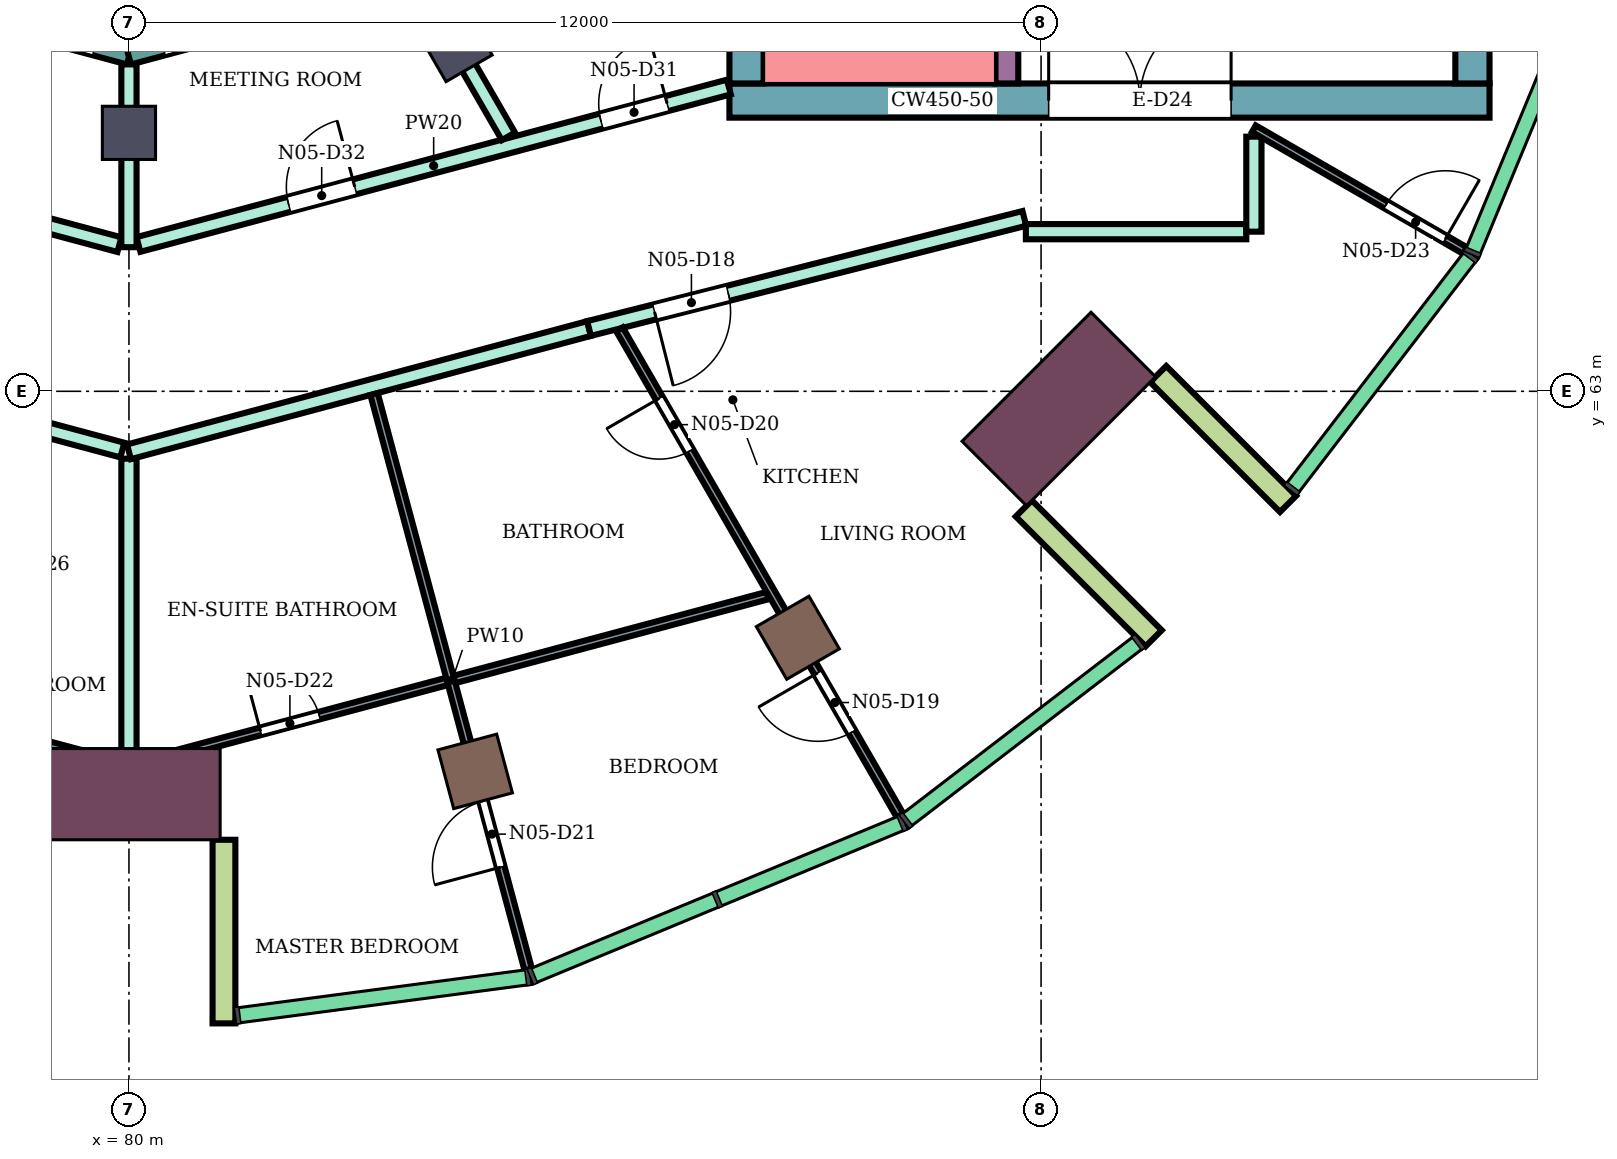
"""IFC4 building model, lengths in metres.
Left out: names, types, materials, properties, quantities, classifications, styles, units other than length and angle.
Written with IfcOpenShell. Run it as: python <this file> out.ifc"""

import sys

from ifc_helpers import new_model, si_unit, direction, frame, frame_2d, origin, origin_2d, place, context, subcontext, project, spatial, rectangle, extrude, element, fill, save


model = new_model("IFC4")
c1 = context("Model", 3, precision=1e-05, world=origin(), true_north=direction((0.0, 1.0)))
c2 = subcontext(c1, "Body", "Model", "MODEL_VIEW")
j1 = project(units=[si_unit("LENGTHUNIT", "METRE"), si_unit("PLANEANGLEUNIT", "RADIAN")], contexts=[c1])
p1 = place(None, origin())
s1 = spatial("IfcSite", under=j1, at=p1, CompositionType="ELEMENT")
p2 = place(p1, origin())
s2 = spatial("IfcBuilding", under=s1, at=p2, CompositionType="ELEMENT")
p3 = place(p2, frame((0.0, 0.0, 319.3)))
s3 = spatial("IfcBuildingStorey", under=s2, at=p3, CompositionType="ELEMENT", Elevation=319.3)
for number, where, z_axis, x_axis in (
    (1, (84.555, 58.0, 0.0), (0.0, 0.0, 1.0), (0.259, -0.966, 0.0)),
    (2, (88.8, 59.758, 0.0), (0.0, 0.0, 1.0), (0.5, -0.866, 0.0)),
):
    element("IfcColumn", number, at=place(p3, frame(where, z_axis=z_axis, x_axis=x_axis)), inside=s3, PredefinedType="COLUMN", context=c2, shape_type="SweptSolid", body=[
        extrude(rectangle(XDim=0.8, YDim=0.8, at=origin_2d()), origin(), (0.0, 0.0, 1.0), 4.4),
    ])
for number, where, z_axis, x_axis in (
    (3, (80.0, 66.4, 0.0), (0.0, 0.0, 1.0), (0.0, -1.0, 0.0)),
    (4, (84.3, 67.552, 0.0), (0.0, 0.0, 1.0), (0.5, -0.866, 0.0)),
):
    element("IfcColumn", number, at=place(p3, frame(where, z_axis=z_axis, x_axis=x_axis)), inside=s3, PredefinedType="COLUMN", context=c2, shape_type="SweptSolid", body=[
        extrude(rectangle(XDim=0.7, YDim=0.7, at=origin_2d()), origin(), (0.0, 0.0, 1.0), 4.4),
    ])
for number, where, z_axis, x_axis in (
    (5, (80.0, 57.7, 0.0), (0.0, 0.0, 1.0), (0.0, -1.0, 0.0)),
    (6, (92.233, 62.767, 0.0), (0.0, 0.0, 1.0), (0.707, -0.707, 0.0)),
):
    element("IfcColumn", number, at=place(p3, frame(where, z_axis=z_axis, x_axis=x_axis)), inside=s3, PredefinedType="COLUMN", context=c2, shape_type="SweptSolid", body=[
        extrude(rectangle(XDim=1.2, YDim=2.4, at=origin_2d()), origin(), (0.0, 0.0, 1.0), 4.4),
    ])
p4 = place(p3, frame((87.9, 66.825, 0.0), z_axis=(0.0, 0.0, 1.0), x_axis=(1.0, 0.0, 0.0)))
e7 = element("IfcWall", 7, at=p4, inside=s3, PredefinedType="SHEAR", context=c2, shape_type="SweptSolid", body=[
    extrude(rectangle(XDim=10.0, YDim=0.45, at=frame_2d((5.0, 0.0))), origin(), (0.0, 0.0, 1.0), 4.08),
])
p5 = place(p4, frame((4.2, 0.0, 0.0)))
e8 = element("IfcOpeningElement", 8, at=p5, cuts=e7, PredefinedType="OPENING", context=c2, shape_type="SweptSolid", body=[
    extrude(rectangle(XDim=2.4, YDim=2.4, at=frame_2d((1.2, 1.2))), frame((0.0, 0.235, 0.0), z_axis=(0.0, -1.0, 0.0), x_axis=(1.0, 0.0, 0.0)), (0.0, 0.0, 1.0), 0.47),
])
p6 = place(p3, frame((88.125, 67.05, 0.0), z_axis=(0.0, 0.0, 1.0), x_axis=(0.0, 1.0, 0.0)))
e9 = element("IfcWall", 9, at=p6, inside=s3, PredefinedType="SHEAR", context=c2, shape_type="SweptSolid", body=[
    extrude(rectangle(XDim=7.95, YDim=0.45, at=frame_2d((3.975, 0.0))), origin(), (0.0, 0.0, 1.0), 4.08),
])
p7 = place(p3, frame((97.675, 67.05, 0.0), z_axis=(0.0, 0.0, 1.0), x_axis=(0.0, 1.0, 0.0)))
e10 = element("IfcWall", 10, at=p7, inside=s3, PredefinedType="SHEAR", context=c2, shape_type="SweptSolid", body=[
    extrude(rectangle(XDim=3.7, YDim=0.45, at=frame_2d((1.85, 0.0))), origin(), (0.0, 0.0, 1.0), 4.08),
])
p8 = place(p3, frame((91.55, 67.05, 0.0), z_axis=(0.0, 0.0, 1.0), x_axis=(0.0, 1.0, 0.0)))
e11 = element("IfcWall", 11, at=p8, inside=s3, PredefinedType="SHEAR", context=c2, shape_type="SweptSolid", body=[
    extrude(rectangle(XDim=7.95, YDim=0.3, at=frame_2d((3.975, 0.0))), origin(), (0.0, 0.0, 1.0), 4.08),
])
p9 = place(p8, frame((0.6, 0.0, 0.0)))
e12 = element("IfcOpeningElement", 12, at=p9, cuts=e11, PredefinedType="OPENING", context=c2, shape_type="SweptSolid", body=[
    extrude(rectangle(XDim=0.9, YDim=2.1, at=frame_2d((0.45, 1.05))), frame((0.0, 0.16, 0.0), z_axis=(0.0, -1.0, 0.0), x_axis=(1.0, 0.0, 0.0)), (0.0, 0.0, 1.0), 0.32),
])
for number, where, z_axis, x_axis in (
    (13, (81.25, 57.1, 0.0), (0.0, 0.0, 1.0), (0.0, -1.0, 0.0)),
    (14, (91.773, 61.459, 0.0), (0.0, 0.0, 1.0), (0.707, -0.707, 0.0)),
    (15, (93.541, 63.227, 0.0), (0.0, 0.0, 1.0), (0.707, -0.707, 0.0)),
):
    element("IfcWall", number, at=place(p3, frame(where, z_axis=z_axis, x_axis=x_axis)), inside=s3, PredefinedType="NOTDEFINED", context=c2, shape_type="SweptSolid", body=[
        extrude(rectangle(XDim=2.416, YDim=0.3, at=frame_2d((1.208, 0.0))), origin(), (0.0, 0.0, 1.0), 4.4),
    ])
p10 = place(p3, frame((76.198, 68.415, 0.0), z_axis=(0.0, 0.0, 1.0), x_axis=(0.965933654434, -0.258789828301, 0.0)))
e16 = element("IfcWall", 16, at=p10, inside=s3, PredefinedType="NOTDEFINED", context=c2, shape_type="SweptSolid", body=[
    extrude(rectangle(XDim=3.936, YDim=0.2, at=frame_2d((1.968, 0.0))), origin(), (0.0, 0.0, 1.0), 4.4),
])
p11 = place(p10, frame((0.468, 0.0, 0.9)))
e17 = element("IfcOpeningElement", 17, at=p11, cuts=e16, PredefinedType="OPENING", context=c2, shape_type="SweptSolid", body=[
    extrude(rectangle(XDim=3.0, YDim=2.3, at=frame_2d((1.5, 1.15))), frame((0.0, 0.11, 0.0), z_axis=(0.0, -1.0, 0.0), x_axis=(1.0, 0.0, 0.0)), (0.0, 0.0, 1.0), 0.22),
])
p12 = place(p3, frame((80.0, 67.396, 0.0), z_axis=(0.0, 0.0, 1.0), x_axis=(0.965933654434, 0.258789828301, 0.0)))
e18 = element("IfcWall", 18, at=p12, inside=s3, PredefinedType="NOTDEFINED", context=c2, shape_type="SweptSolid", body=[
    extrude(rectangle(XDim=3.936, YDim=0.2, at=frame_2d((1.968, 0.0))), origin(), (0.0, 0.0, 1.0), 4.4),
])
p13 = place(p12, frame((0.468, 0.0, 0.9)))
e19 = element("IfcOpeningElement", 19, at=p13, cuts=e18, PredefinedType="OPENING", context=c2, shape_type="SweptSolid", body=[
    extrude(rectangle(XDim=3.0, YDim=2.3, at=frame_2d((1.5, 1.15))), frame((0.0, 0.11, 0.0), z_axis=(0.0, -1.0, 0.0), x_axis=(1.0, 0.0, 0.0)), (0.0, 0.0, 1.0), 0.22),
])
p14 = place(p3, frame((73.947, 63.826, 0.0), z_axis=(0.0, 0.0, 1.0), x_axis=(0.965894934009, -0.25893430915, 0.0)))
e20 = element("IfcWall", 20, at=p14, inside=s3, PredefinedType="PARTITIONING", context=c2, shape_type="SweptSolid", body=[
    extrude(rectangle(XDim=6.177, YDim=0.2, at=frame_2d((3.088, 0.0))), origin(), (0.0, 0.0, 1.0), 3.95),
])
p15 = place(p14, frame((3.336, 0.0, 0.0)))
e21 = element("IfcOpeningElement", 21, at=p15, cuts=e20, PredefinedType="OPENING", context=c2, shape_type="SweptSolid", body=[
    extrude(rectangle(XDim=1.0, YDim=2.1, at=frame_2d((0.5, 1.05))), frame((0.0, 0.11, 0.0), z_axis=(0.0, -1.0, 0.0), x_axis=(1.0, 0.0, 0.0)), (0.0, 0.0, 1.0), 0.22),
])
p16 = place(p14, frame((1.424, 0.0, 0.0)))
e22 = element("IfcOpeningElement", 22, at=p16, cuts=e20, PredefinedType="OPENING", context=c2, shape_type="SweptSolid", body=[
    extrude(rectangle(XDim=1.0, YDim=2.1, at=frame_2d((0.5, 1.05))), frame((0.0, 0.11, 0.0), z_axis=(0.0, -1.0, 0.0), x_axis=(1.0, 0.0, 0.0)), (0.0, 0.0, 1.0), 0.22),
])
p17 = place(p3, frame((74.603, 66.342, 0.0), z_axis=(0.0, 0.0, 1.0), x_axis=(0.965920893652, -0.258837453254, 0.0)))
e23 = element("IfcWall", 23, at=p17, inside=s3, PredefinedType="PARTITIONING", context=c2, shape_type="SweptSolid", body=[
    extrude(rectangle(XDim=5.458, YDim=0.2, at=frame_2d((2.729, 0.0))), origin(), (0.0, 0.0, 1.0), 3.95),
])
p18 = place(p17, frame((2.512, 0.0, 0.0)))
e24 = element("IfcOpeningElement", 24, at=p18, cuts=e23, PredefinedType="OPENING", context=c2, shape_type="SweptSolid", body=[
    extrude(rectangle(XDim=0.9, YDim=2.1, at=frame_2d((0.45, 1.05))), frame((0.0, 0.11, 0.0), z_axis=(0.0, -1.0, 0.0), x_axis=(1.0, 0.0, 0.0)), (0.0, 0.0, 1.0), 0.22),
])
p19 = place(p3, frame((80.125, 64.932, 0.0), z_axis=(0.0, 0.0, 1.0), x_axis=(0.966236955806, 0.257655089674, 0.0)))
e25 = element("IfcWall", 25, at=p19, inside=s3, PredefinedType="PARTITIONING", context=c2, shape_type="SweptSolid", body=[
    extrude(rectangle(XDim=8.039, YDim=0.2, at=frame_2d((4.02, 0.0))), origin(), (0.0, 0.0, 1.0), 3.95),
])
p20 = place(p19, frame((6.298, 0.0, 0.0)))
e26 = element("IfcOpeningElement", 26, at=p20, cuts=e25, PredefinedType="OPENING", context=c2, shape_type="SweptSolid", body=[
    extrude(rectangle(XDim=0.9, YDim=2.1, at=frame_2d((0.45, 1.05))), frame((0.0, 0.11, 0.0), z_axis=(0.0, -1.0, 0.0), x_axis=(1.0, 0.0, 0.0)), (0.0, 0.0, 1.0), 0.22),
])
p21 = place(p19, frame((2.045, 0.0, 0.0)))
e27 = element("IfcOpeningElement", 27, at=p21, cuts=e25, PredefinedType="OPENING", context=c2, shape_type="SweptSolid", body=[
    extrude(rectangle(XDim=0.9, YDim=2.1, at=frame_2d((0.45, 1.05))), frame((0.0, 0.11, 0.0), z_axis=(0.0, -1.0, 0.0), x_axis=(1.0, 0.0, 0.0)), (0.0, 0.0, 1.0), 0.22),
])
p22 = place(p3, frame((80.0, 57.3, 0.0), z_axis=(0.0, 0.0, 1.0), x_axis=(0.0, 1.0, 0.0)))
e28 = element("IfcWall", 28, at=p22, inside=s3, PredefinedType="PARTITIONING", context=c2, shape_type="SweptSolid", body=[
    extrude(rectangle(XDim=4.814, YDim=0.2, at=frame_2d((2.407, 0.0))), origin(), (0.0, 0.0, 1.0), 3.95),
])
p23 = place(p3, frame((80.0, 62.204, 0.0), z_axis=(0.0, 0.0, 1.0), x_axis=(0.965938139786, 0.258773086132, 0.0)))
e29 = element("IfcWall", 29, at=p23, inside=s3, PredefinedType="PARTITIONING", context=c2, shape_type="SweptSolid", body=[
    extrude(rectangle(XDim=6.266, YDim=0.2, at=frame_2d((3.133, 0.0))), origin(), (0.0, 0.0, 1.0), 3.95),
])
p24 = place(p3, frame((80.0, 64.896, 0.0), z_axis=(0.0, 0.0, 1.0), x_axis=(0.0, 1.0, 0.0)))
e30 = element("IfcWall", 30, at=p24, inside=s3, PredefinedType="PARTITIONING", context=c2, shape_type="SweptSolid", body=[
    extrude(rectangle(XDim=2.405, YDim=0.2, at=frame_2d((1.203, 0.0))), origin(), (0.0, 0.0, 1.0), 3.95),
])
p25 = place(p3, frame((83.85, 68.333, 0.0), z_axis=(0.0, 0.0, 1.0), x_axis=(0.500080019051, -0.865979199835, 0.0)))
e31 = element("IfcWall", 31, at=p25, inside=s3, PredefinedType="PARTITIONING", context=c2, shape_type="SweptSolid", body=[
    extrude(rectangle(XDim=2.285, YDim=0.2, at=frame_2d((1.143, 0.0))), origin(), (0.0, 0.0, 1.0), 3.95),
])
p26 = place(p3, frame((86.053, 63.826, 0.0), z_axis=(0.0, 0.0, 1.0), x_axis=(0.969480070232, 0.245170131586, 0.0)))
e32 = element("IfcWall", 32, at=p26, inside=s3, PredefinedType="PARTITIONING", context=c2, shape_type="SweptSolid", body=[
    extrude(rectangle(XDim=5.907, YDim=0.2, at=frame_2d((2.954, 0.0))), origin(), (0.0, 0.0, 1.0), 3.95),
])
p27 = place(p26, frame((0.889, 0.0, 0.0)))
e33 = element("IfcOpeningElement", 33, at=p27, cuts=e32, PredefinedType="OPENING", context=c2, shape_type="SweptSolid", body=[
    extrude(rectangle(XDim=1.0, YDim=2.1, at=frame_2d((0.5, 1.05))), frame((0.0, 0.11, 0.0), z_axis=(0.0, -1.0, 0.0), x_axis=(1.0, 0.0, 0.0)), (0.0, 0.0, 1.0), 0.22),
])
p28 = place(p3, frame((91.8, 65.1, 0.0), z_axis=(0.0, 0.0, 1.0), x_axis=(1.0, 0.0, 0.0)))
e34 = element("IfcWall", 34, at=p28, inside=s3, PredefinedType="PARTITIONING", context=c2, shape_type="SweptSolid", body=[
    extrude(rectangle(XDim=2.9, YDim=0.2, at=frame_2d((1.45, 0.0))), origin(), (0.0, 0.0, 1.0), 3.95),
])
p29 = place(p3, frame((94.8, 65.1, 0.0), z_axis=(0.0, 0.0, 1.0), x_axis=(0.0, 1.0, 0.0)))
e35 = element("IfcWall", 35, at=p29, inside=s3, PredefinedType="PARTITIONING", context=c2, shape_type="SweptSolid", body=[
    extrude(rectangle(XDim=1.25, YDim=0.2, at=frame_2d((0.625, 0.0))), origin(), (0.0, 0.0, 1.0), 3.95),
])
p30 = place(p3, frame((75.862, 59.171, 0.0), z_axis=(0.0, 0.0, 1.0), x_axis=(0.965961623338, -0.258685411723, 0.0)))
e36 = element("IfcWall", 36, at=p30, inside=s3, PredefinedType="PARTITIONING", context=c2, shape_type="SweptSolid", body=[
    extrude(rectangle(XDim=4.174, YDim=0.1, at=frame_2d((2.087, 0.0))), origin(), (0.0, 0.0, 1.0), 3.95),
])
p31 = place(p30, frame((0.363, 0.0, 0.0)))
e37 = element("IfcOpeningElement", 37, at=p31, cuts=e36, PredefinedType="OPENING", context=c2, shape_type="SweptSolid", body=[
    extrude(rectangle(XDim=0.9, YDim=2.1, at=frame_2d((0.45, 1.05))), frame((0.0, 0.06, 0.0), z_axis=(0.0, -1.0, 0.0), x_axis=(1.0, 0.0, 0.0)), (0.0, 0.0, 1.0), 0.12),
])
p32 = place(p3, frame((80.106, 58.092, 0.0), z_axis=(0.0, 0.0, 1.0), x_axis=(0.965971139599, 0.258649874274, 0.0)))
e38 = element("IfcWall", 38, at=p32, inside=s3, PredefinedType="PARTITIONING", context=c2, shape_type="SweptSolid", body=[
    extrude(rectangle(XDim=8.588, YDim=0.1, at=frame_2d((4.294, 0.0))), origin(), (0.0, 0.0, 1.0), 3.95),
])
p33 = place(p32, frame((1.682, 0.0, 0.0)))
e39 = element("IfcOpeningElement", 39, at=p33, cuts=e38, PredefinedType="OPENING", context=c2, shape_type="SweptSolid", body=[
    extrude(rectangle(XDim=0.8, YDim=2.1, at=frame_2d((0.4, 1.05))), frame((0.0, 0.06, 0.0), z_axis=(0.0, -1.0, 0.0), x_axis=(1.0, 0.0, 0.0)), (0.0, 0.0, 1.0), 0.12),
])
p34 = place(p3, frame((83.224, 62.964, 0.0), z_axis=(0.0, 0.0, 1.0), x_axis=(0.258779160476, -0.96593651246, 0.0)))
e40 = element("IfcWall", 40, at=p34, inside=s3, PredefinedType="PARTITIONING", context=c2, shape_type="SweptSolid", body=[
    extrude(rectangle(XDim=7.838, YDim=0.1, at=frame_2d((3.919, 0.0))), origin(), (0.0, 0.0, 1.0), 3.95),
])
p35 = place(p34, frame((5.544, 0.0, 0.0)))
e41 = element("IfcOpeningElement", 41, at=p35, cuts=e40, PredefinedType="OPENING", context=c2, shape_type="SweptSolid", body=[
    extrude(rectangle(XDim=0.9, YDim=2.1, at=frame_2d((0.45, 1.05))), frame((0.0, 0.06, 0.0), z_axis=(0.0, -1.0, 0.0), x_axis=(1.0, 0.0, 0.0)), (0.0, 0.0, 1.0), 0.12),
])
p36 = place(p3, frame((86.453, 63.817, 0.0), z_axis=(0.0, 0.0, 1.0), x_axis=(0.499822611913, -0.866127794624, 0.0)))
e42 = element("IfcWall", 42, at=p36, inside=s3, PredefinedType="PARTITIONING", context=c2, shape_type="SweptSolid", body=[
    extrude(rectangle(XDim=7.385, YDim=0.1, at=frame_2d((3.693, 0.0))), origin(), (0.0, 0.0, 1.0), 3.95),
])
p37 = place(p36, frame((5.22, 0.0, 0.0)))
e43 = element("IfcOpeningElement", 43, at=p37, cuts=e42, PredefinedType="OPENING", context=c2, shape_type="SweptSolid", body=[
    extrude(rectangle(XDim=0.9, YDim=2.1, at=frame_2d((0.45, 1.05))), frame((0.0, 0.06, 0.0), z_axis=(0.0, -1.0, 0.0), x_axis=(1.0, 0.0, 0.0)), (0.0, 0.0, 1.0), 0.12),
])
p38 = place(p36, frame((1.05, 0.0, 0.0)))
e44 = element("IfcOpeningElement", 44, at=p38, cuts=e42, PredefinedType="OPENING", context=c2, shape_type="SweptSolid", body=[
    extrude(rectangle(XDim=0.8, YDim=2.1, at=frame_2d((0.4, 1.05))), frame((0.0, 0.06, 0.0), z_axis=(0.0, -1.0, 0.0), x_axis=(1.0, 0.0, 0.0)), (0.0, 0.0, 1.0), 0.12),
])
p39 = place(p3, frame((94.8, 66.455, 0.0), z_axis=(0.0, 0.0, 1.0), x_axis=(0.866056279496, -0.499946517884, 0.0)))
e45 = element("IfcWall", 45, at=p39, inside=s3, PredefinedType="PARTITIONING", context=c2, shape_type="SweptSolid", body=[
    extrude(rectangle(XDim=3.207, YDim=0.1, at=frame_2d((1.604, 0.0))), origin(), (0.0, 0.0, 1.0), 3.95),
])
p40 = place(p39, frame((2.007, 0.0, 0.0)))
e46 = element("IfcOpeningElement", 46, at=p40, cuts=e45, PredefinedType="OPENING", context=c2, shape_type="SweptSolid", body=[
    extrude(rectangle(XDim=0.9, YDim=2.1, at=frame_2d((0.45, 1.05))), frame((0.0, 0.06, 0.0), z_axis=(0.0, -1.0, 0.0), x_axis=(1.0, 0.0, 0.0)), (0.0, 0.0, 1.0), 0.12),
])
p41 = place(p27, frame((1.0, 0.0, 0.0), z_axis=(0.0, 0.0, 1.0), x_axis=(-1.0, 0.0, 0.0)))
e47 = element("IfcDoor", 47, at=p41, inside=s3, OperationType="SINGLE_SWING_RIGHT", PredefinedType="DOOR", context=c2, shape_type="SweptSolid", body=[
    extrude(rectangle(XDim=1.0, YDim=2.1, at=frame_2d((0.5, 1.05))), frame((0.0, 0.025, 0.0), z_axis=(0.0, -1.0, 0.0), x_axis=(1.0, 0.0, 0.0)), (0.0, 0.0, 1.0), 0.05),
])
fill(e33, e47)
p42 = place(p37, frame((0.9, 0.0, 0.0), z_axis=(0.0, 0.0, 1.0), x_axis=(-1.0, 0.0, 0.0)))
e48 = element("IfcDoor", 48, at=p42, inside=s3, OperationType="SINGLE_SWING_RIGHT", PredefinedType="DOOR", context=c2, shape_type="SweptSolid", body=[
    extrude(rectangle(XDim=0.9, YDim=2.1, at=frame_2d((0.45, 1.05))), frame((0.0, 0.025, 0.0), z_axis=(0.0, -1.0, 0.0), x_axis=(1.0, 0.0, 0.0)), (0.0, 0.0, 1.0), 0.05),
])
fill(e43, e48)
p43 = place(p38, frame((0.8, 0.0, 0.0), z_axis=(0.0, 0.0, 1.0), x_axis=(-1.0, 0.0, 0.0)))
e49 = element("IfcDoor", 49, at=p43, inside=s3, OperationType="SINGLE_SWING_RIGHT", PredefinedType="DOOR", context=c2, shape_type="SweptSolid", body=[
    extrude(rectangle(XDim=0.8, YDim=2.1, at=frame_2d((0.4, 1.05))), frame((0.0, 0.025, 0.0), z_axis=(0.0, -1.0, 0.0), x_axis=(1.0, 0.0, 0.0)), (0.0, 0.0, 1.0), 0.05),
])
fill(e44, e49)
p44 = place(p35, frame((0.9, 0.0, 0.0), z_axis=(0.0, 0.0, 1.0), x_axis=(-1.0, 0.0, 0.0)))
e50 = element("IfcDoor", 50, at=p44, inside=s3, OperationType="SINGLE_SWING_LEFT", PredefinedType="DOOR", context=c2, shape_type="SweptSolid", body=[
    extrude(rectangle(XDim=0.9, YDim=2.1, at=frame_2d((0.45, 1.05))), frame((0.0, 0.025, 0.0), z_axis=(0.0, -1.0, 0.0), x_axis=(1.0, 0.0, 0.0)), (0.0, 0.0, 1.0), 0.05),
])
fill(e41, e50)
p45 = place(p33, origin())
e51 = element("IfcDoor", 51, at=p45, inside=s3, OperationType="SINGLE_SWING_LEFT", PredefinedType="DOOR", context=c2, shape_type="SweptSolid", body=[
    extrude(rectangle(XDim=0.8, YDim=2.1, at=frame_2d((0.4, 1.05))), frame((0.0, 0.025, 0.0), z_axis=(0.0, -1.0, 0.0), x_axis=(1.0, 0.0, 0.0)), (0.0, 0.0, 1.0), 0.05),
])
fill(e39, e51)
p46 = place(p40, origin())
e52 = element("IfcDoor", 52, at=p46, inside=s3, OperationType="SINGLE_SWING_RIGHT", PredefinedType="DOOR", context=c2, shape_type="SweptSolid", body=[
    extrude(rectangle(XDim=0.9, YDim=2.1, at=frame_2d((0.45, 1.05))), frame((0.0, 0.025, 0.0), z_axis=(0.0, -1.0, 0.0), x_axis=(1.0, 0.0, 0.0)), (0.0, 0.0, 1.0), 0.05),
])
fill(e46, e52)
p47 = place(p20, origin())
e53 = element("IfcDoor", 53, at=p47, inside=s3, OperationType="SINGLE_SWING_RIGHT", PredefinedType="DOOR", context=c2, shape_type="SweptSolid", body=[
    extrude(rectangle(XDim=0.9, YDim=2.1, at=frame_2d((0.45, 1.05))), frame((0.0, 0.025, 0.0), z_axis=(0.0, -1.0, 0.0), x_axis=(1.0, 0.0, 0.0)), (0.0, 0.0, 1.0), 0.05),
])
fill(e26, e53)
p48 = place(p21, origin())
e54 = element("IfcDoor", 54, at=p48, inside=s3, OperationType="SINGLE_SWING_RIGHT", PredefinedType="DOOR", context=c2, shape_type="SweptSolid", body=[
    extrude(rectangle(XDim=0.9, YDim=2.1, at=frame_2d((0.45, 1.05))), frame((0.0, 0.025, 0.0), z_axis=(0.0, -1.0, 0.0), x_axis=(1.0, 0.0, 0.0)), (0.0, 0.0, 1.0), 0.05),
])
fill(e27, e54)
p49 = place(p5, origin())
e55 = element("IfcDoor", 55, at=p49, inside=s3, OperationType="DOUBLE_DOOR_SINGLE_SWING", PredefinedType="DOOR", context=c2, shape_type="SweptSolid", body=[
    extrude(rectangle(XDim=2.4, YDim=2.4, at=frame_2d((1.2, 1.2))), frame((0.0, 0.025, 0.0), z_axis=(0.0, -1.0, 0.0), x_axis=(1.0, 0.0, 0.0)), (0.0, 0.0, 1.0), 0.05),
])
fill(e8, e55)
save(model, sys.argv[1])
